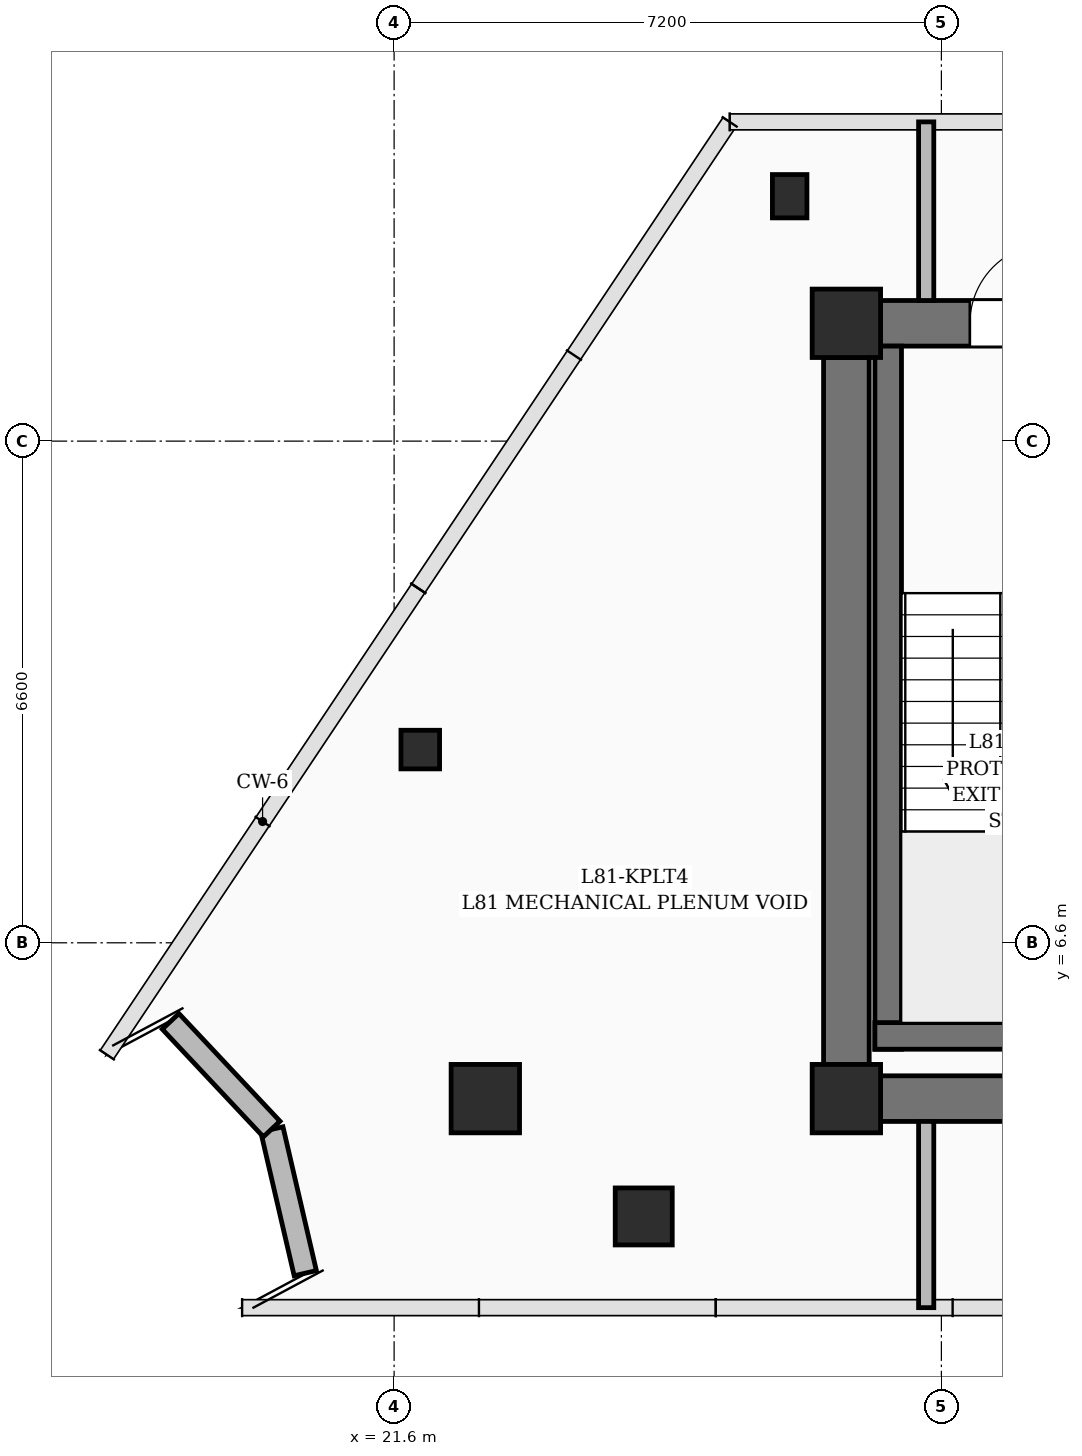
"""IFC4 building model, lengths in metres.
Left out: names, types, materials, properties, quantities, classifications, styles, units other than length and angle.
Written with IfcOpenShell. Run it as: python <this file> out.ifc"""

import sys

from ifc_helpers import new_model, si_unit, direction, frame, frame_2d, origin, origin_2d, place, context, subcontext, project, spatial, rectangle, hollow_circle, i_section, extrude, element, fill, save


model = new_model("IFC4")
c1 = context("Model", 3, precision=1e-05, world=origin(), true_north=direction((0.0, 1.0)))
c2 = subcontext(c1, "Body", "Model", "MODEL_VIEW")
j1 = project(units=[si_unit("LENGTHUNIT", "METRE"), si_unit("PLANEANGLEUNIT", "RADIAN")], contexts=[c1])
p1 = place(None, origin())
s1 = spatial("IfcSite", under=j1, at=p1, CompositionType="ELEMENT")
p2 = place(p1, origin())
s2 = spatial("IfcBuilding", under=s1, at=p2, CompositionType="ELEMENT")
p3 = place(p2, frame((0.0, 0.0, 314.5)))
s3 = spatial("IfcBuildingStorey", under=s2, at=p3, CompositionType="ELEMENT", Elevation=314.5)
for number, where, z_axis, x_axis in (
    (1, (27.55, 4.55, 0.0), (0.0, 0.0, 1.0), (1.0, 0.0, 0.0)),
    (2, (27.55, 14.75, 0.0), (0.0, 0.0, 1.0), (1.0, 0.0, 0.0)),
    (3, (22.8, 4.55, 0.0), (0.0, 0.0, 1.0), (1.0, 0.0, 0.0)),
):
    element("IfcColumn", number, at=place(p3, frame(where, z_axis=z_axis, x_axis=x_axis)), inside=s3, PredefinedType="COLUMN", context=c2, shape_type="SweptSolid", body=[
        extrude(rectangle(XDim=0.9, YDim=0.9, at=origin_2d()), origin(), (0.0, 0.0, 1.0), 4.0),
    ])
p4 = place(p3, frame((28.0, 4.55, 0.0), z_axis=(0.0, 0.0, 1.0), x_axis=(1.0, 0.0, 0.0)))
e4 = element("IfcWall", 4, at=p4, inside=s3, PredefinedType="SHEAR", context=c2, shape_type="SweptSolid", body=[
    extrude(rectangle(XDim=6.7, YDim=0.6, at=frame_2d((3.35, 0.0))), origin(), (0.0, 0.0, 1.0), 4.0),
])
p5 = place(p3, frame((28.0, 14.75, 0.0), z_axis=(0.0, 0.0, 1.0), x_axis=(1.0, 0.0, 0.0)))
e5 = element("IfcWall", 5, at=p5, inside=s3, PredefinedType="SHEAR", context=c2, shape_type="SweptSolid", body=[
    extrude(rectangle(XDim=6.7, YDim=0.6, at=frame_2d((3.35, 0.0))), origin(), (0.0, 0.0, 1.0), 4.0),
])
p6 = place(p5, frame((1.175, 0.0, 0.0)))
e6 = element("IfcOpeningElement", 6, at=p6, cuts=e5, PredefinedType="OPENING", context=c2, shape_type="SweptSolid", body=[
    extrude(rectangle(XDim=1.05, YDim=2.15, at=frame_2d((0.525, 1.075))), frame((0.0, 0.31, 0.0), z_axis=(0.0, -1.0, 0.0), x_axis=(1.0, 0.0, 0.0)), (0.0, 0.0, 1.0), 0.62),
])
p7 = place(p5, frame((5.025, 0.0, 0.0)))
e7 = element("IfcOpeningElement", 7, at=p7, cuts=e5, PredefinedType="OPENING", context=c2, shape_type="SweptSolid", body=[
    extrude(rectangle(XDim=0.95, YDim=2.15, at=frame_2d((0.475, 1.075))), frame((0.0, 0.31, 0.0), z_axis=(0.0, -1.0, 0.0), x_axis=(1.0, 0.0, 0.0)), (0.0, 0.0, 1.0), 0.62),
])
p8 = place(p3, frame((27.55, 5.0, 0.0), z_axis=(0.0, 0.0, 1.0), x_axis=(0.0, 1.0, 0.0)))
e8 = element("IfcWall", 8, at=p8, inside=s3, PredefinedType="SHEAR", context=c2, shape_type="SweptSolid", body=[
    extrude(rectangle(XDim=9.3, YDim=0.6, at=frame_2d((4.65, 0.0))), origin(), (0.0, 0.0, 1.0), 4.0),
])
p9 = place(p3, frame((28.1, 5.2, 0.0), z_axis=(0.0, 0.0, 1.0), x_axis=(0.0, 1.0, 0.0)))
e9 = element("IfcWall", 9, at=p9, inside=s3, PredefinedType="SOLIDWALL", context=c2, shape_type="SweptSolid", body=[
    extrude(rectangle(XDim=9.25, YDim=0.35, at=frame_2d((4.625, 0.0))), origin(), (0.0, 0.0, 1.0), 4.0),
])
p10 = place(p3, frame((27.925, 5.375, 0.0), z_axis=(0.0, 0.0, 1.0), x_axis=(1.0, 0.0, 0.0)))
e10 = element("IfcWall", 10, at=p10, inside=s3, PredefinedType="SOLIDWALL", context=c2, shape_type="SweptSolid", body=[
    extrude(rectangle(XDim=3.55, YDim=0.35, at=frame_2d((1.775, 0.0))), origin(), (0.0, 0.0, 1.0), 4.0),
])
p11 = place(p3, frame((24.884, 3.0, 0.0), z_axis=(0.0, 0.0, 1.0), x_axis=(1.0, 0.0, 0.0)))
e11 = element("IfcColumn", 11, at=p11, inside=s3, PredefinedType="COLUMN", context=c2, shape_type="SweptSolid", body=[
    extrude(rectangle(XDim=0.75, YDim=0.75, at=origin_2d()), origin(), (0.0, 0.0, 1.0), 4.0),
])
p12 = place(p3, frame((26.804, 16.422, 0.0), z_axis=(0.0, 0.0, 1.0), x_axis=(1.0, 0.0, 0.0)))
e12 = element("IfcColumn", 12, at=p12, inside=s3, PredefinedType="COLUMN", context=c2, shape_type="SweptSolid", body=[
    extrude(i_section(OverallWidth=0.454, OverallDepth=0.57, WebThickness=0.078, FlangeThickness=0.094, FilletRadius=0.02, at=origin_2d()), origin(), (0.0, 0.0, 1.0), 4.0),
])
p13 = place(p3, frame((21.944, 9.142, 0.0), z_axis=(0.0, 0.0, 1.0), x_axis=(1.0, 0.0, 0.0)))
e13 = element("IfcColumn", 13, at=p13, inside=s3, PredefinedType="COLUMN", context=c2, shape_type="SweptSolid", body=[
    extrude(hollow_circle(Radius=0.254, WallThickness=0.016, at=origin_2d()), origin(), (0.0, 0.0, 1.0), 4.0),
])
p14 = place(p3, frame((20.431, 2.253, 0.0), z_axis=(0.0, 0.0, 1.0), x_axis=(-0.226355436514, 0.97404477123, 0.0)))
e14 = element("IfcWall", 14, at=p14, inside=s3, PredefinedType="SOLIDWALL", context=c2, shape_type="SweptSolid", body=[
    extrude(rectangle(XDim=1.943, YDim=0.3, at=frame_2d((0.971, 0.0))), origin(), (0.0, 0.0, 1.0), 3.7),
])
p15 = place(p3, frame((19.989, 4.15, 0.0), z_axis=(0.0, 0.0, 1.0), x_axis=(-0.684517683679, 0.728996255636, 0.0)))
e15 = element("IfcWall", 15, at=p15, inside=s3, PredefinedType="SOLIDWALL", context=c2, shape_type="SweptSolid", body=[
    extrude(rectangle(XDim=1.943, YDim=0.3, at=frame_2d((0.972, 0.0))), origin(), (0.0, 0.0, 1.0), 3.7),
])
p16 = place(p3, frame((28.6, 4.25, 0.0), z_axis=(0.0, 0.0, 1.0), x_axis=(0.0, -1.0, 0.0)))
e16 = element("IfcWall", 16, at=p16, inside=s3, PredefinedType="PARTITIONING", context=c2, shape_type="SweptSolid", body=[
    extrude(rectangle(XDim=2.45, YDim=0.2, at=frame_2d((1.225, 0.0))), origin(), (0.0, 0.0, 1.0), 2.977),
])
p17 = place(p3, frame((28.6, 17.4, 0.0), z_axis=(0.0, 0.0, 1.0), x_axis=(0.0, -1.0, 0.0)))
e17 = element("IfcWall", 17, at=p17, inside=s3, PredefinedType="PARTITIONING", context=c2, shape_type="SweptSolid", body=[
    extrude(rectangle(XDim=2.35, YDim=0.2, at=frame_2d((1.175, 0.0))), origin(), (0.0, 0.0, 1.0), 3.7),
])
p18 = place(p6, origin())
e18 = element("IfcDoor", 18, at=p18, inside=s3, OperationType="SINGLE_SWING_RIGHT", PredefinedType="DOOR", context=c2, shape_type="SweptSolid", body=[
    extrude(rectangle(XDim=1.05, YDim=2.15, at=frame_2d((0.525, 1.075))), frame((0.0, 0.025, 0.0), z_axis=(0.0, -1.0, 0.0), x_axis=(1.0, 0.0, 0.0)), (0.0, 0.0, 1.0), 0.05),
])
fill(e6, e18)
save(model, sys.argv[1])
